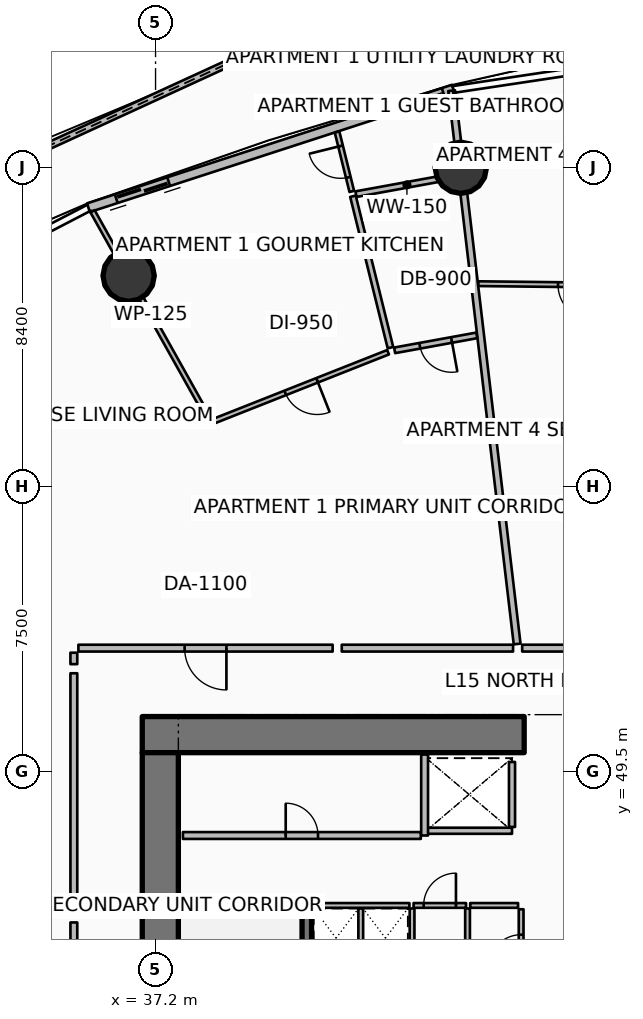
"""IFC4 building model, lengths in metres.
Left out: names, types, materials, properties, quantities, classifications, styles, units other than length and angle.
Written with IfcOpenShell. Run it as: python <this file> out.ifc"""

import sys

from ifc_helpers import new_model, si_unit, direction, frame, frame_2d, origin, origin_2d, place, context, subcontext, project, spatial, polyline, rectangle, circle, outline, extrude, element, fill, save


model = new_model("IFC4")
c1 = context("Model", 3, precision=1e-05, world=origin(), true_north=direction((0.0, 1.0)))
c2 = subcontext(c1, "Body", "Model", "MODEL_VIEW")
j1 = project(units=[si_unit("LENGTHUNIT", "METRE"), si_unit("PLANEANGLEUNIT", "RADIAN")], contexts=[c1])
p1 = place(None, origin())
s1 = spatial("IfcSite", under=j1, at=p1, CompositionType="ELEMENT")
p2 = place(p1, origin())
s2 = spatial("IfcBuilding", under=s1, at=p2, CompositionType="ELEMENT")
p3 = place(p2, frame((0.0, 0.0, 63.9)))
s3 = spatial("IfcBuildingStorey", under=s2, at=p3, CompositionType="ELEMENT", Elevation=63.9)
p4 = place(p3, frame((36.85, 50.475, 0.0), z_axis=(0.0, 0.0, 1.0), x_axis=(1.0, 0.0, 0.0)))
e1 = element("IfcWall", 1, at=p4, inside=s3, PredefinedType="SHEAR", context=c2, shape_type="SweptSolid", body=[
    extrude(rectangle(XDim=10.05, YDim=0.95, at=frame_2d((5.025, 0.0))), origin(), (0.0, 0.0, 1.0), 3.75),
])
p5 = place(p3, frame((37.325, 34.0, 0.0), z_axis=(0.0, 0.0, 1.0), x_axis=(0.0, 1.0, 0.0)))
e2 = element("IfcWall", 2, at=p5, inside=s3, PredefinedType="SHEAR", context=c2, shape_type="SweptSolid", body=[
    extrude(rectangle(XDim=16.0, YDim=0.95, at=frame_2d((8.0, 0.0))), origin(), (0.0, 0.0, 1.0), 3.75),
])
p6 = place(p3, frame((37.8, 45.94, 0.0), z_axis=(0.0, 0.0, 1.0), x_axis=(1.0, 0.0, 0.0)))
e3 = element("IfcWall", 3, at=p6, inside=s3, PredefinedType="SHEAR", context=c2, shape_type="SweptSolid", body=[
    extrude(rectangle(XDim=3.5, YDim=0.28, at=frame_2d((1.75, 0.0))), origin(), (0.0, 0.0, 1.0), 3.75),
])
for number, where, z_axis, x_axis in (
    (4, (45.232, 65.389, 0.0), (0.0, 0.0, 1.0), (1.0, 0.0, 0.0)),
    (5, (36.492, 62.55, 0.0), (0.0, 0.0, 1.0), (1.0, 0.0, 0.0)),
):
    element("IfcColumn", number, at=place(p3, frame(where, z_axis=z_axis, x_axis=x_axis)), inside=s3, PredefinedType="COLUMN", context=c2, shape_type="SweptSolid", body=[
        extrude(circle(Radius=0.675, at=origin_2d()), origin(), (0.0, 0.0, 1.0), 3.5),
    ])
p7 = place(p3, frame((50.126, 71.299, 0.0), z_axis=(0.0, 0.0, 1.0), x_axis=(-0.962607038131, -0.270901624471, 0.0)))
e6 = element("IfcWall", 6, at=p7, inside=s3, PredefinedType="PARAPET", context=c2, shape_type="SweptSolid", body=[
    extrude(outline(polyline([(0.0, 0.0), (10.964, 0.0), (10.964, 1.632), (5.482, 1.798), (0.0, 1.86), (0.0, 0.0)])), frame((0.0, 0.09, 0.0), z_axis=(0.0, -1.0, 0.0), x_axis=(1.0, 0.0, 0.0)), (0.0, 0.0, 1.0), 0.18),
])
p8 = place(p3, frame((39.347, 68.246, 0.0), z_axis=(0.0, 0.0, 1.0), x_axis=(-0.908702116292, -0.417445162681, 0.0)))
e7 = element("IfcWall", 7, at=p8, inside=s3, PredefinedType="PARAPET", context=c2, shape_type="SweptSolid", body=[
    extrude(outline(polyline([(0.0, 0.0), (10.697, 0.0), (10.697, 1.233), (5.348, 1.418), (0.0, 1.632), (0.0, 0.0)])), frame((0.0, 0.09, 0.0), z_axis=(0.0, -1.0, 0.0), x_axis=(1.0, 0.0, 0.0)), (0.0, 0.0, 1.0), 0.18),
])
p9 = place(p3, frame((45.036, 67.458, 0.0), z_axis=(0.0, 0.0, 1.0), x_axis=(-0.951054679225, -0.309022648238, 0.0)))
e8 = element("IfcWall", 8, at=p9, inside=s3, PredefinedType="SOLIDWALL", context=c2, shape_type="SweptSolid", body=[
    extrude(rectangle(XDim=10.097, YDim=0.24, at=frame_2d((5.048, 0.0))), origin(), (0.0, 0.0, 1.0), 2.45),
])
p10 = place(p9, frame((7.877, 0.0, 0.0)))
e9 = element("IfcOpeningElement", 9, at=p10, cuts=e8, PredefinedType="OPENING", context=c2, shape_type="SweptSolid", body=[
    extrude(rectangle(XDim=1.45, YDim=2.15, at=frame_2d((0.725, 1.075))), frame((0.0, 0.13, 0.0), z_axis=(0.0, -1.0, 0.0), x_axis=(1.0, 0.0, 0.0)), (0.0, 0.0, 1.0), 0.26),
])
p11 = place(p9, frame((0.28, 0.0, 0.65)))
e10 = element("IfcOpeningElement", 10, at=p11, cuts=e8, PredefinedType="OPENING", context=c2, shape_type="SweptSolid", body=[
    extrude(rectangle(XDim=1.6, YDim=1.5, at=frame_2d((0.8, 0.75))), frame((0.0, 0.13, 0.0), z_axis=(0.0, -1.0, 0.0), x_axis=(1.0, 0.0, 0.0)), (0.0, 0.0, 1.0), 0.26),
])
p12 = place(p3, frame((41.18, 38.22, 0.0), z_axis=(0.0, 0.0, 1.0), x_axis=(0.0, 1.0, 0.0)))
e11 = element("IfcWall", 11, at=p12, inside=s3, PredefinedType="SOLIDWALL", context=c2, shape_type="SweptSolid", body=[
    extrude(rectangle(XDim=7.56, YDim=0.25, at=frame_2d((3.78, 0.0))), origin(), (0.0, 0.0, 1.0), 3.5),
])
p13 = place(p12, frame((0.3, 0.0, 0.0)))
e12 = element("IfcOpeningElement", 12, at=p13, cuts=e11, PredefinedType="OPENING", context=c2, shape_type="SweptSolid", body=[
    extrude(rectangle(XDim=1.55, YDim=2.15, at=frame_2d((0.775, 1.075))), frame((0.0, 0.135, 0.0), z_axis=(0.0, -1.0, 0.0), x_axis=(1.0, 0.0, 0.0)), (0.0, 0.0, 1.0), 0.27),
])
p14 = place(p3, frame((46.58, 47.945, 0.0), z_axis=(0.0, 0.0, 1.0), x_axis=(-1.0, 0.0, 0.0)))
e13 = element("IfcWall", 13, at=p14, inside=s3, PredefinedType="PARTITIONING", context=c2, shape_type="SweptSolid", body=[
    extrude(rectangle(XDim=2.26, YDim=0.16, at=frame_2d((1.13, 0.0))), origin(), (0.0, 0.0, 1.0), 3.5),
])
p15 = place(p3, frame((46.58, 48.045, 0.0), z_axis=(0.0, 0.0, 1.0), x_axis=(0.0, 1.0, 0.0)))
e14 = element("IfcWall", 14, at=p15, inside=s3, PredefinedType="PARTITIONING", context=c2, shape_type="SweptSolid", body=[
    extrude(rectangle(XDim=1.71, YDim=0.16, at=frame_2d((0.855, 0.0))), origin(), (0.0, 0.0, 1.0), 3.5),
])
p16 = place(p3, frame((37.92, 47.82, 0.0), z_axis=(0.0, 0.0, 1.0), x_axis=(1.0, 0.0, 0.0)))
e15 = element("IfcWall", 15, at=p16, inside=s3, PredefinedType="PARTITIONING", context=c2, shape_type="SweptSolid", body=[
    extrude(rectangle(XDim=6.26, YDim=0.18, at=frame_2d((3.13, 0.0))), origin(), (0.0, 0.0, 1.0), 3.5),
])
p17 = place(p16, frame((2.705, 0.0, 0.0)))
e16 = element("IfcOpeningElement", 16, at=p17, cuts=e15, PredefinedType="OPENING", context=c2, shape_type="SweptSolid", body=[
    extrude(rectangle(XDim=0.85, YDim=2.06, at=frame_2d((0.425, 1.03))), frame((0.0, 0.1, 0.0), z_axis=(0.0, -1.0, 0.0), x_axis=(1.0, 0.0, 0.0)), (0.0, 0.0, 1.0), 0.2),
])
p18 = place(p3, frame((44.28, 47.82, 0.0), z_axis=(0.0, 0.0, 1.0), x_axis=(0.0, 1.0, 0.0)))
e17 = element("IfcWall", 17, at=p18, inside=s3, PredefinedType="PARTITIONING", context=c2, shape_type="SweptSolid", body=[
    extrude(rectangle(XDim=2.13, YDim=0.18, at=frame_2d((1.065, 0.0))), origin(), (0.0, 0.0, 1.0), 3.5),
])
p19 = place(p3, frame((42.6, 44.35, 0.0), z_axis=(0.0, 0.0, 1.0), x_axis=(0.0, 1.0, 0.0)))
e18 = element("IfcWall", 18, at=p19, inside=s3, PredefinedType="PARTITIONING", context=c2, shape_type="SweptSolid", body=[
    extrude(rectangle(XDim=1.55, YDim=0.125, at=frame_2d((0.775, 0.0))), origin(), (0.0, 0.0, 1.0), 2.94),
])
p20 = place(p3, frame((43.95, 41.58, 0.0), z_axis=(0.0, 0.0, 1.0), x_axis=(0.0, 1.0, 0.0)))
e19 = element("IfcWall", 19, at=p20, inside=s3, PredefinedType="PARTITIONING", context=c2, shape_type="SweptSolid", body=[
    extrude(rectangle(XDim=4.32, YDim=0.125, at=frame_2d((2.16, 0.0))), origin(), (0.0, 0.0, 1.0), 2.94),
])
p21 = place(p3, frame((45.41, 43.67, 0.0), z_axis=(0.0, 0.0, 1.0), x_axis=(0.0, 1.0, 0.0)))
e20 = element("IfcWall", 20, at=p21, inside=s3, PredefinedType="PARTITIONING", context=c2, shape_type="SweptSolid", body=[
    extrude(rectangle(XDim=2.23, YDim=0.125, at=frame_2d((1.115, 0.0))), origin(), (0.0, 0.0, 1.0), 2.94),
])
p22 = place(p3, frame((46.82, 43.69, 0.0), z_axis=(0.0, 0.0, 1.0), x_axis=(0.0, 1.0, 0.0)))
e21 = element("IfcWall", 21, at=p22, inside=s3, PredefinedType="PARTITIONING", context=c2, shape_type="SweptSolid", body=[
    extrude(rectangle(XDim=2.19, YDim=0.125, at=frame_2d((1.095, 0.0))), origin(), (0.0, 0.0, 1.0), 2.94),
])
p23 = place(p22, frame((0.67, 0.0, 0.0)))
e22 = element("IfcOpeningElement", 22, at=p23, cuts=e21, PredefinedType="OPENING", context=c2, shape_type="SweptSolid", body=[
    extrude(rectangle(XDim=0.85, YDim=2.06, at=frame_2d((0.425, 1.03))), frame((0.0, 0.073, 0.0), z_axis=(0.0, -1.0, 0.0), x_axis=(1.0, 0.0, 0.0)), (0.0, 0.0, 1.0), 0.145),
])
p24 = place(p3, frame((41.35, 45.98, 0.0), z_axis=(0.0, 0.0, 1.0), x_axis=(1.0, 0.0, 0.0)))
e23 = element("IfcWall", 23, at=p24, inside=s3, PredefinedType="PARTITIONING", context=c2, shape_type="SweptSolid", body=[
    extrude(rectangle(XDim=2.53, YDim=0.125, at=frame_2d((1.265, 0.0))), origin(), (0.0, 0.0, 1.0), 2.94),
])
p25 = place(p3, frame((43.99, 45.98, 0.0), z_axis=(0.0, 0.0, 1.0), x_axis=(1.0, 0.0, 0.0)))
e24 = element("IfcWall", 24, at=p25, inside=s3, PredefinedType="PARTITIONING", context=c2, shape_type="SweptSolid", body=[
    extrude(rectangle(XDim=1.38, YDim=0.125, at=frame_2d((0.69, 0.0))), origin(), (0.0, 0.0, 1.0), 2.94),
])
p26 = place(p25, frame((0.265, 0.0, 0.0)))
e25 = element("IfcOpeningElement", 25, at=p26, cuts=e24, PredefinedType="OPENING", context=c2, shape_type="SweptSolid", body=[
    extrude(rectangle(XDim=0.85, YDim=2.06, at=frame_2d((0.425, 1.03))), frame((0.0, 0.073, 0.0), z_axis=(0.0, -1.0, 0.0), x_axis=(1.0, 0.0, 0.0)), (0.0, 0.0, 1.0), 0.145),
])
p27 = place(p3, frame((45.48, 45.98, 0.0), z_axis=(0.0, 0.0, 1.0), x_axis=(1.0, 0.0, 0.0)))
e26 = element("IfcWall", 26, at=p27, inside=s3, PredefinedType="PARTITIONING", context=c2, shape_type="SweptSolid", body=[
    extrude(rectangle(XDim=1.26, YDim=0.125, at=frame_2d((0.63, 0.0))), origin(), (0.0, 0.0, 1.0), 2.94),
])
p28 = place(p3, frame((46.715, 52.859, 0.0), z_axis=(0.0, 0.0, 1.0), x_axis=(-0.117534950089, 0.993068746617, 0.0)))
e27 = element("IfcWall", 27, at=p28, inside=s3, PredefinedType="PARTITIONING", context=c2, shape_type="SweptSolid", body=[
    extrude(rectangle(XDim=14.661, YDim=0.18, at=frame_2d((7.33, 0.0))), origin(), (0.0, 0.0, 1.0), 2.867),
])
p29 = place(p3, frame((41.86, 52.75, 0.0), z_axis=(0.0, 0.0, 1.0), x_axis=(-1.0, 0.0, 0.0)))
e28 = element("IfcWall", 28, at=p29, inside=s3, PredefinedType="PARTITIONING", context=c2, shape_type="SweptSolid", body=[
    extrude(rectangle(XDim=6.69, YDim=0.18, at=frame_2d((3.345, 0.0))), origin(), (0.0, 0.0, 1.0), 2.867),
])
p30 = place(p29, frame((2.795, 0.0, 0.0)))
e29 = element("IfcOpeningElement", 29, at=p30, cuts=e28, PredefinedType="OPENING", context=c2, shape_type="SweptSolid", body=[
    extrude(rectangle(XDim=1.1, YDim=2.1, at=frame_2d((0.55, 1.05))), frame((0.0, 0.1, 0.0), z_axis=(0.0, -1.0, 0.0), x_axis=(1.0, 0.0, 0.0)), (0.0, 0.0, 1.0), 0.2),
])
p31 = place(p3, frame((35.05, 52.63, 0.0), z_axis=(0.0, 0.0, 1.0), x_axis=(0.0, -1.0, 0.0)))
e30 = element("IfcWall", 30, at=p31, inside=s3, PredefinedType="PARTITIONING", context=c2, shape_type="SweptSolid", body=[
    extrude(rectangle(XDim=0.301, YDim=0.18, at=frame_2d((0.15, 0.0))), origin(), (0.0, 0.0, 1.0), 2.867),
])
p32 = place(p3, frame((46.608, 52.75, 0.0), z_axis=(0.0, 0.0, 1.0), x_axis=(-1.0, 0.0, 0.0)))
e31 = element("IfcWall", 31, at=p32, inside=s3, PredefinedType="PARTITIONING", context=c2, shape_type="SweptSolid", body=[
    extrude(rectangle(XDim=4.508, YDim=0.18, at=frame_2d((2.254, 0.0))), origin(), (0.0, 0.0, 1.0), 2.867),
])
p33 = place(p3, frame((38.604, 58.778, 0.0), z_axis=(0.0, 0.0, 1.0), x_axis=(-0.488617606889, 0.872498042541, 0.0)))
e32 = element("IfcWall", 32, at=p33, inside=s3, PredefinedType="PARTITIONING", context=c2, shape_type="SweptSolid", body=[
    extrude(rectangle(XDim=6.266, YDim=0.125, at=frame_2d((3.133, 0.0))), origin(), (0.0, 0.0, 1.0), 2.867),
])
p34 = place(p3, frame((45.653, 60.979, 0.0), z_axis=(0.0, 0.0, 1.0), x_axis=(-0.983791601568, -0.179315600783, 0.0)))
e33 = element("IfcWall", 33, at=p34, inside=s3, PredefinedType="PARTITIONING", context=c2, shape_type="SweptSolid", body=[
    extrude(rectangle(XDim=2.198, YDim=0.15, at=frame_2d((1.099, 0.0))), origin(), (0.0, 0.0, 1.0), 2.867),
])
p35 = place(p34, frame((0.674, 0.0, 0.0)))
e34 = element("IfcOpeningElement", 34, at=p35, cuts=e33, PredefinedType="OPENING", context=c2, shape_type="SweptSolid", body=[
    extrude(rectangle(XDim=0.85, YDim=2.06, at=frame_2d((0.425, 1.03))), frame((0.0, 0.085, 0.0), z_axis=(0.0, -1.0, 0.0), x_axis=(1.0, 0.0, 0.0)), (0.0, 0.0, 1.0), 0.17),
])
p36 = place(p3, frame((45.156, 65.184, 0.0), z_axis=(0.0, 0.0, 1.0), x_axis=(-0.983792433056, -0.179311038873, 0.0)))
e35 = element("IfcWall", 35, at=p36, inside=s3, PredefinedType="PARTITIONING", context=c2, shape_type="SweptSolid", body=[
    extrude(rectangle(XDim=2.726, YDim=0.15, at=frame_2d((1.363, 0.0))), origin(), (0.0, 0.0, 1.0), 2.867),
])
p37 = place(p3, frame((43.381, 60.657, 0.0), z_axis=(0.0, 0.0, 1.0), x_axis=(-0.240281337946, 0.97070329073, 0.0)))
e36 = element("IfcWall", 36, at=p37, inside=s3, PredefinedType="PARTITIONING", context=c2, shape_type="SweptSolid", body=[
    extrude(rectangle(XDim=4.104, YDim=0.15, at=frame_2d((2.052, 0.0))), origin(), (0.0, 0.0, 1.0), 2.94),
])
p38 = place(p3, frame((42.364, 64.767, 0.0), z_axis=(0.0, 0.0, 1.0), x_axis=(-0.240399183991, 0.970674112324, 0.0)))
e37 = element("IfcWall", 37, at=p38, inside=s3, PredefinedType="PARTITIONING", context=c2, shape_type="SweptSolid", body=[
    extrude(rectangle(XDim=1.614, YDim=0.125, at=frame_2d((0.807, 0.0))), origin(), (0.0, 0.0, 1.0), 2.94),
])
p39 = place(p38, frame((0.382, 0.0, 0.0)))
e38 = element("IfcOpeningElement", 38, at=p39, cuts=e37, PredefinedType="OPENING", context=c2, shape_type="SweptSolid", body=[
    extrude(rectangle(XDim=0.85, YDim=2.06, at=frame_2d((0.425, 1.03))), frame((0.0, 0.073, 0.0), z_axis=(0.0, -1.0, 0.0), x_axis=(1.0, 0.0, 0.0)), (0.0, 0.0, 1.0), 0.145),
])
p40 = place(p3, frame((43.319, 60.536, 0.0), z_axis=(0.0, 0.0, 1.0), x_axis=(-0.929910978534, -0.367784681576, 0.0)))
e39 = element("IfcWall", 39, at=p40, inside=s3, PredefinedType="PARTITIONING", context=c2, shape_type="SweptSolid", body=[
    extrude(rectangle(XDim=4.918, YDim=0.125, at=frame_2d((2.459, 0.0))), origin(), (0.0, 0.0, 1.0), 2.867),
])
p41 = place(p40, frame((2.009, 0.0, 0.0)))
e40 = element("IfcOpeningElement", 40, at=p41, cuts=e39, PredefinedType="OPENING", context=c2, shape_type="SweptSolid", body=[
    extrude(rectangle(XDim=0.9, YDim=2.08, at=frame_2d((0.45, 1.04))), frame((0.0, 0.073, 0.0), z_axis=(0.0, -1.0, 0.0), x_axis=(1.0, 0.0, 0.0)), (0.0, 0.0, 1.0), 0.145),
])
p42 = place(p3, frame((35.05, 52.089, 0.0), z_axis=(0.0, 0.0, 1.0), x_axis=(0.0, -1.0, 0.0)))
e41 = element("IfcWall", 41, at=p42, inside=s3, PredefinedType="PARTITIONING", context=c2, shape_type="SweptSolid", body=[
    extrude(rectangle(XDim=6.317, YDim=0.18, at=frame_2d((3.158, 0.0))), origin(), (0.0, 0.0, 1.0), 2.867),
])
p43 = place(p3, frame((35.05, 45.532, 0.0), z_axis=(0.0, 0.0, 1.0), x_axis=(0.0, -1.0, 0.0)))
e42 = element("IfcWall", 42, at=p43, inside=s3, PredefinedType="PARTITIONING", context=c2, shape_type="SweptSolid", body=[
    extrude(rectangle(XDim=4.945, YDim=0.18, at=frame_2d((2.472, 0.0))), origin(), (0.0, 0.0, 1.0), 2.867),
])
p44 = place(p3, frame((50.912, 52.75, 0.0), z_axis=(0.0, 0.0, 1.0), x_axis=(-1.0, 0.0, 0.0)))
e43 = element("IfcWall", 43, at=p44, inside=s3, PredefinedType="PARTITIONING", context=c2, shape_type="SweptSolid", body=[
    extrude(rectangle(XDim=4.064, YDim=0.18, at=frame_2d((2.032, 0.0))), origin(), (0.0, 0.0, 1.0), 2.867),
])
p45 = place(p3, frame((50.79, 62.282, 0.0), z_axis=(0.0, 0.0, 1.0), x_axis=(-0.99993505002, 0.011397181261, 0.0)))
e44 = element("IfcWall", 44, at=p45, inside=s3, PredefinedType="PARTITIONING", context=c2, shape_type="SweptSolid", body=[
    extrude(rectangle(XDim=5.098, YDim=0.125, at=frame_2d((2.549, 0.0))), origin(), (0.0, 0.0, 1.0), 2.867),
])
p46 = place(p45, frame((2.099, 0.0, 0.0)))
e45 = element("IfcOpeningElement", 45, at=p46, cuts=e44, PredefinedType="OPENING", context=c2, shape_type="SweptSolid", body=[
    extrude(rectangle(XDim=0.9, YDim=2.08, at=frame_2d((0.45, 1.04))), frame((0.0, 0.073, 0.0), z_axis=(0.0, -1.0, 0.0), x_axis=(1.0, 0.0, 0.0)), (0.0, 0.0, 1.0), 0.145),
])
p47 = place(p10, origin())
e46 = element("IfcDoor", 46, at=p47, inside=s3, OperationType="DOUBLE_DOOR_SLIDING", PredefinedType="DOOR", context=c2, shape_type="SweptSolid", body=[
    extrude(rectangle(XDim=1.45, YDim=2.15, at=frame_2d((0.725, 1.075))), frame((0.0, 0.025, 0.0), z_axis=(0.0, -1.0, 0.0), x_axis=(1.0, 0.0, 0.0)), (0.0, 0.0, 1.0), 0.05),
])
fill(e9, e46)
p48 = place(p11, origin())
e47 = element("IfcWindow", 47, at=p48, inside=s3, PartitioningType="SINGLE_PANEL", PredefinedType="WINDOW", context=c2, shape_type="SweptSolid", body=[
    extrude(rectangle(XDim=1.6, YDim=1.5, at=frame_2d((0.8, 0.75))), frame((0.0, 0.03, 0.0), z_axis=(0.0, -1.0, 0.0), x_axis=(1.0, 0.0, 0.0)), (0.0, 0.0, 1.0), 0.06),
])
fill(e10, e47)
p49 = place(p17, origin())
e48 = element("IfcDoor", 48, at=p49, inside=s3, OperationType="SINGLE_SWING_LEFT", PredefinedType="DOOR", context=c2, shape_type="SweptSolid", body=[
    extrude(rectangle(XDim=0.85, YDim=2.06, at=frame_2d((0.425, 1.03))), frame((0.0, 0.025, 0.0), z_axis=(0.0, -1.0, 0.0), x_axis=(1.0, 0.0, 0.0)), (0.0, 0.0, 1.0), 0.05),
])
fill(e16, e48)
p50 = place(p23, origin())
e49 = element("IfcDoor", 49, at=p50, inside=s3, OperationType="SINGLE_SWING_LEFT", PredefinedType="DOOR", context=c2, shape_type="SweptSolid", body=[
    extrude(rectangle(XDim=0.85, YDim=2.06, at=frame_2d((0.425, 1.03))), frame((0.0, 0.025, 0.0), z_axis=(0.0, -1.0, 0.0), x_axis=(1.0, 0.0, 0.0)), (0.0, 0.0, 1.0), 0.05),
])
fill(e22, e49)
p51 = place(p26, origin())
e50 = element("IfcDoor", 50, at=p51, inside=s3, OperationType="SINGLE_SWING_RIGHT", PredefinedType="DOOR", context=c2, shape_type="SweptSolid", body=[
    extrude(rectangle(XDim=0.85, YDim=2.06, at=frame_2d((0.425, 1.03))), frame((0.0, 0.025, 0.0), z_axis=(0.0, -1.0, 0.0), x_axis=(1.0, 0.0, 0.0)), (0.0, 0.0, 1.0), 0.05),
])
fill(e25, e50)
p52 = place(p30, origin())
e51 = element("IfcDoor", 51, at=p52, inside=s3, OperationType="SINGLE_SWING_LEFT", PredefinedType="DOOR", context=c2, shape_type="SweptSolid", body=[
    extrude(rectangle(XDim=1.1, YDim=2.1, at=frame_2d((0.55, 1.05))), frame((0.0, 0.025, 0.0), z_axis=(0.0, -1.0, 0.0), x_axis=(1.0, 0.0, 0.0)), (0.0, 0.0, 1.0), 0.05),
])
fill(e29, e51)
p53 = place(p35, origin())
e52 = element("IfcDoor", 52, at=p53, inside=s3, OperationType="SINGLE_SWING_LEFT", PredefinedType="DOOR", context=c2, shape_type="SweptSolid", body=[
    extrude(rectangle(XDim=0.85, YDim=2.06, at=frame_2d((0.425, 1.03))), frame((0.0, 0.025, 0.0), z_axis=(0.0, -1.0, 0.0), x_axis=(1.0, 0.0, 0.0)), (0.0, 0.0, 1.0), 0.05),
])
fill(e34, e52)
p54 = place(p39, origin())
e53 = element("IfcDoor", 53, at=p54, inside=s3, OperationType="SINGLE_SWING_RIGHT", PredefinedType="DOOR", context=c2, shape_type="SweptSolid", body=[
    extrude(rectangle(XDim=0.85, YDim=2.06, at=frame_2d((0.425, 1.03))), frame((0.0, 0.025, 0.0), z_axis=(0.0, -1.0, 0.0), x_axis=(1.0, 0.0, 0.0)), (0.0, 0.0, 1.0), 0.05),
])
fill(e38, e53)
p55 = place(p41, origin())
e54 = element("IfcDoor", 54, at=p55, inside=s3, OperationType="SINGLE_SWING_LEFT", PredefinedType="DOOR", context=c2, shape_type="SweptSolid", body=[
    extrude(rectangle(XDim=0.9, YDim=2.08, at=frame_2d((0.45, 1.04))), frame((0.0, 0.025, 0.0), z_axis=(0.0, -1.0, 0.0), x_axis=(1.0, 0.0, 0.0)), (0.0, 0.0, 1.0), 0.05),
])
fill(e40, e54)
p56 = place(p46, origin())
e55 = element("IfcDoor", 55, at=p56, inside=s3, OperationType="SINGLE_SWING_LEFT", PredefinedType="DOOR", context=c2, shape_type="SweptSolid", body=[
    extrude(rectangle(XDim=0.9, YDim=2.08, at=frame_2d((0.45, 1.04))), frame((0.0, 0.025, 0.0), z_axis=(0.0, -1.0, 0.0), x_axis=(1.0, 0.0, 0.0)), (0.0, 0.0, 1.0), 0.05),
])
fill(e45, e55)
save(model, sys.argv[1])
